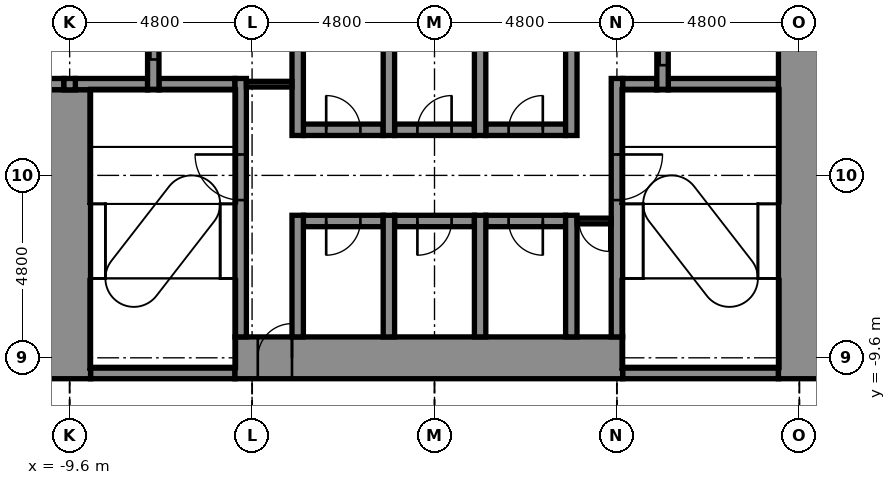
"""IFC4 building model, lengths in metres.
Left out: names, types, materials, properties, quantities, classifications, styles, units other than length and angle.
Written with IfcOpenShell. Run it as: python <this file> out.ifc"""

import sys

from ifc_helpers import new_model, si_unit, direction, frame, frame_2d, origin, place, context, subcontext, project, spatial, rectangle, extrude, element, fill, save


model = new_model("IFC4")
c1 = context("Model", 3, precision=1e-05, world=origin(), true_north=direction((0.0, 1.0)))
c2 = subcontext(c1, "Body", "Model", "MODEL_VIEW")
j1 = project(units=[si_unit("LENGTHUNIT", "METRE"), si_unit("PLANEANGLEUNIT", "RADIAN")], contexts=[c1])
p1 = place(None, origin())
s1 = spatial("IfcSite", under=j1, at=p1, CompositionType="ELEMENT")
p2 = place(p1, origin())
s2 = spatial("IfcBuilding", under=s1, at=p2, CompositionType="ELEMENT")
p3 = place(p2, frame((0.0, 0.0, 44.4)))
s3 = spatial("IfcBuildingStorey", under=s2, at=p3, CompositionType="ELEMENT", Elevation=44.4)
p4 = place(p3, frame((-9.05, -10.0, -0.25), z_axis=(0.0, 0.0, 1.0), x_axis=(1.0, 0.0, 0.0)))
e1 = element("IfcWall", 1, at=p4, inside=s3, PredefinedType="STANDARD", context=c2, shape_type="SweptSolid", body=[
    extrude(rectangle(XDim=3.8, YDim=0.3, at=frame_2d((1.9, 0.0))), origin(), (0.0, 0.0, 1.0), 5.5),
])
p5 = place(p3, frame((4.95, -10.0, -0.25), z_axis=(0.0, 0.0, 1.0), x_axis=(1.0, 0.0, 0.0)))
e2 = element("IfcWall", 2, at=p5, inside=s3, PredefinedType="STANDARD", context=c2, shape_type="SweptSolid", body=[
    extrude(rectangle(XDim=4.1, YDim=0.3, at=frame_2d((2.05, 0.0))), origin(), (0.0, 0.0, 1.0), 5.5),
])
p6 = place(p3, frame((-5.25, -9.6, -0.25), z_axis=(0.0, 0.0, 1.0), x_axis=(1.0, 0.0, 0.0)))
e3 = element("IfcWall", 3, at=p6, inside=s3, PredefinedType="SHEAR", context=c2, shape_type="SweptSolid", body=[
    extrude(rectangle(XDim=10.2, YDim=1.1, at=frame_2d((5.1, 0.0))), origin(), (0.0, 0.0, 1.0), 5.5),
])
p7 = place(p6, frame((0.6, 0.0, 0.25)))
e4 = element("IfcOpeningElement", 4, at=p7, cuts=e3, PredefinedType="OPENING", context=c2, shape_type="SweptSolid", body=[
    extrude(rectangle(XDim=0.9, YDim=2.1, at=frame_2d((0.45, 1.05))), frame((0.0, 0.56, 0.0), z_axis=(0.0, -1.0, 0.0), x_axis=(1.0, 0.0, 0.0)), (0.0, 0.0, 1.0), 1.12),
])
p8 = place(p3, frame((-3.45, -6.0, -0.25), z_axis=(0.0, 0.0, 1.0), x_axis=(1.0, 0.0, 0.0)))
e5 = element("IfcWall", 5, at=p8, inside=s3, PredefinedType="STANDARD", context=c2, shape_type="SweptSolid", body=[
    extrude(rectangle(XDim=2.1, YDim=0.3, at=frame_2d((1.05, 0.0))), origin(), (0.0, 0.0, 1.0), 5.5),
])
p9 = place(p8, frame((0.6, 0.0, 0.25)))
e6 = element("IfcOpeningElement", 6, at=p9, cuts=e5, PredefinedType="OPENING", context=c2, shape_type="SweptSolid", body=[
    extrude(rectangle(XDim=0.9, YDim=2.1, at=frame_2d((0.45, 1.05))), frame((0.0, 0.16, 0.0), z_axis=(0.0, -1.0, 0.0), x_axis=(1.0, 0.0, 0.0)), (0.0, 0.0, 1.0), 0.32),
])
p10 = place(p3, frame((-1.05, -6.0, -0.25), z_axis=(0.0, 0.0, 1.0), x_axis=(1.0, 0.0, 0.0)))
e7 = element("IfcWall", 7, at=p10, inside=s3, PredefinedType="STANDARD", context=c2, shape_type="SweptSolid", body=[
    extrude(rectangle(XDim=2.1, YDim=0.3, at=frame_2d((1.05, 0.0))), origin(), (0.0, 0.0, 1.0), 5.5),
])
p11 = place(p10, frame((0.6, 0.0, 0.25)))
e8 = element("IfcOpeningElement", 8, at=p11, cuts=e7, PredefinedType="OPENING", context=c2, shape_type="SweptSolid", body=[
    extrude(rectangle(XDim=0.9, YDim=2.1, at=frame_2d((0.45, 1.05))), frame((0.0, 0.16, 0.0), z_axis=(0.0, -1.0, 0.0), x_axis=(1.0, 0.0, 0.0)), (0.0, 0.0, 1.0), 0.32),
])
p12 = place(p3, frame((1.35, -6.0, -0.25), z_axis=(0.0, 0.0, 1.0), x_axis=(1.0, 0.0, 0.0)))
e9 = element("IfcWall", 9, at=p12, inside=s3, PredefinedType="STANDARD", context=c2, shape_type="SweptSolid", body=[
    extrude(rectangle(XDim=2.1, YDim=0.3, at=frame_2d((1.05, 0.0))), origin(), (0.0, 0.0, 1.0), 5.5),
])
p13 = place(p12, frame((0.6, 0.0, 0.25)))
e10 = element("IfcOpeningElement", 10, at=p13, cuts=e9, PredefinedType="OPENING", context=c2, shape_type="SweptSolid", body=[
    extrude(rectangle(XDim=0.9, YDim=2.1, at=frame_2d((0.45, 1.05))), frame((0.0, 0.16, 0.0), z_axis=(0.0, -1.0, 0.0), x_axis=(1.0, 0.0, 0.0)), (0.0, 0.0, 1.0), 0.32),
])
p14 = place(p3, frame((-3.45, -3.6, -0.25), z_axis=(0.0, 0.0, 1.0), x_axis=(1.0, 0.0, 0.0)))
e11 = element("IfcWall", 11, at=p14, inside=s3, PredefinedType="STANDARD", context=c2, shape_type="SweptSolid", body=[
    extrude(rectangle(XDim=2.1, YDim=0.3, at=frame_2d((1.05, 0.0))), origin(), (0.0, 0.0, 1.0), 5.5),
])
p15 = place(p14, frame((0.6, 0.0, 0.25)))
e12 = element("IfcOpeningElement", 12, at=p15, cuts=e11, PredefinedType="OPENING", context=c2, shape_type="SweptSolid", body=[
    extrude(rectangle(XDim=0.9, YDim=2.1, at=frame_2d((0.45, 1.05))), frame((0.0, 0.16, 0.0), z_axis=(0.0, -1.0, 0.0), x_axis=(1.0, 0.0, 0.0)), (0.0, 0.0, 1.0), 0.32),
])
p16 = place(p3, frame((-1.05, -3.6, -0.25), z_axis=(0.0, 0.0, 1.0), x_axis=(1.0, 0.0, 0.0)))
e13 = element("IfcWall", 13, at=p16, inside=s3, PredefinedType="STANDARD", context=c2, shape_type="SweptSolid", body=[
    extrude(rectangle(XDim=2.1, YDim=0.3, at=frame_2d((1.05, 0.0))), origin(), (0.0, 0.0, 1.0), 5.5),
])
p17 = place(p16, frame((0.6, 0.0, 0.25)))
e14 = element("IfcOpeningElement", 14, at=p17, cuts=e13, PredefinedType="OPENING", context=c2, shape_type="SweptSolid", body=[
    extrude(rectangle(XDim=0.9, YDim=2.1, at=frame_2d((0.45, 1.05))), frame((0.0, 0.16, 0.0), z_axis=(0.0, -1.0, 0.0), x_axis=(1.0, 0.0, 0.0)), (0.0, 0.0, 1.0), 0.32),
])
p18 = place(p3, frame((1.35, -3.6, -0.25), z_axis=(0.0, 0.0, 1.0), x_axis=(1.0, 0.0, 0.0)))
e15 = element("IfcWall", 15, at=p18, inside=s3, PredefinedType="STANDARD", context=c2, shape_type="SweptSolid", body=[
    extrude(rectangle(XDim=2.1, YDim=0.3, at=frame_2d((1.05, 0.0))), origin(), (0.0, 0.0, 1.0), 5.5),
])
p19 = place(p18, frame((0.6, 0.0, 0.25)))
e16 = element("IfcOpeningElement", 16, at=p19, cuts=e15, PredefinedType="OPENING", context=c2, shape_type="SweptSolid", body=[
    extrude(rectangle(XDim=0.9, YDim=2.1, at=frame_2d((0.45, 1.05))), frame((0.0, 0.16, 0.0), z_axis=(0.0, -1.0, 0.0), x_axis=(1.0, 0.0, 0.0)), (0.0, 0.0, 1.0), 0.32),
])
p20 = place(p3, frame((-10.85, -2.4, -0.25), z_axis=(0.0, 0.0, 1.0), x_axis=(1.0, 0.0, 0.0)))
e17 = element("IfcWall", 17, at=p20, inside=s3, PredefinedType="STANDARD", context=c2, shape_type="SweptSolid", body=[
    extrude(rectangle(XDim=1.1, YDim=0.3, at=frame_2d((0.55, 0.0))), origin(), (0.0, 0.0, 1.0), 5.5),
])
p21 = place(p3, frame((-9.45, -2.4, -0.25), z_axis=(0.0, 0.0, 1.0), x_axis=(1.0, 0.0, 0.0)))
e18 = element("IfcWall", 18, at=p21, inside=s3, PredefinedType="STANDARD", context=c2, shape_type="SweptSolid", body=[
    extrude(rectangle(XDim=1.9, YDim=0.3, at=frame_2d((0.95, 0.0))), origin(), (0.0, 0.0, 1.0), 5.5),
])
p22 = place(p3, frame((-7.25, -2.4, -0.25), z_axis=(0.0, 0.0, 1.0), x_axis=(1.0, 0.0, 0.0)))
e19 = element("IfcWall", 19, at=p22, inside=s3, PredefinedType="STANDARD", context=c2, shape_type="SweptSolid", body=[
    extrude(rectangle(XDim=2.0, YDim=0.3, at=frame_2d((1.0, 0.0))), origin(), (0.0, 0.0, 1.0), 5.5),
])
p23 = place(p3, frame((4.95, -2.4, -0.25), z_axis=(0.0, 0.0, 1.0), x_axis=(1.0, 0.0, 0.0)))
e20 = element("IfcWall", 20, at=p23, inside=s3, PredefinedType="STANDARD", context=c2, shape_type="SweptSolid", body=[
    extrude(rectangle(XDim=0.9, YDim=0.3, at=frame_2d((0.45, 0.0))), origin(), (0.0, 0.0, 1.0), 5.5),
])
p24 = place(p3, frame((6.15, -2.4, -0.25), z_axis=(0.0, 0.0, 1.0), x_axis=(1.0, 0.0, 0.0)))
e21 = element("IfcWall", 21, at=p24, inside=s3, PredefinedType="STANDARD", context=c2, shape_type="SweptSolid", body=[
    extrude(rectangle(XDim=2.9, YDim=0.3, at=frame_2d((1.45, 0.0))), origin(), (0.0, 0.0, 1.0), 5.5),
])
p25 = place(p3, frame((-9.6, -10.15, -0.25), z_axis=(0.0, 0.0, 1.0), x_axis=(0.0, 1.0, 0.0)))
e22 = element("IfcWall", 22, at=p25, inside=s3, PredefinedType="SHEAR", context=c2, shape_type="SweptSolid", body=[
    extrude(rectangle(XDim=7.6, YDim=1.1, at=frame_2d((3.8, 0.0))), origin(), (0.0, 0.0, 1.0), 5.5),
])
p26 = place(p3, frame((-9.6, -2.55, -0.25), z_axis=(0.0, 0.0, 1.0), x_axis=(0.0, 1.0, 0.0)))
e23 = element("IfcWall", 23, at=p26, inside=s3, PredefinedType="STANDARD", context=c2, shape_type="SweptSolid", body=[
    extrude(rectangle(XDim=0.3, YDim=0.3, at=frame_2d((0.15, 0.0))), origin(), (0.0, 0.0, 1.0), 5.5),
])
p27 = place(p3, frame((-7.4, -2.55, -0.25), z_axis=(0.0, 0.0, 1.0), x_axis=(0.0, 1.0, 0.0)))
e24 = element("IfcWall", 24, at=p27, inside=s3, PredefinedType="STANDARD", context=c2, shape_type="SweptSolid", body=[
    extrude(rectangle(XDim=5.1, YDim=0.3, at=frame_2d((2.55, 0.0))), origin(), (0.0, 0.0, 1.0), 5.5),
])
p28 = place(p27, frame((0.8, 0.0, 0.25)))
e25 = element("IfcOpeningElement", 25, at=p28, cuts=e24, PredefinedType="OPENING", context=c2, shape_type="SweptSolid", body=[
    extrude(rectangle(XDim=1.1, YDim=2.1, at=frame_2d((0.55, 1.05))), frame((0.0, 0.16, 0.0), z_axis=(0.0, -1.0, 0.0), x_axis=(1.0, 0.0, 0.0)), (0.0, 0.0, 1.0), 0.32),
])
p29 = place(p27, frame((3.2, 0.0, 0.25)))
e26 = element("IfcOpeningElement", 26, at=p29, cuts=e24, PredefinedType="OPENING", context=c2, shape_type="SweptSolid", body=[
    extrude(rectangle(XDim=1.1, YDim=2.1, at=frame_2d((0.55, 1.05))), frame((0.0, 0.16, 0.0), z_axis=(0.0, -1.0, 0.0), x_axis=(1.0, 0.0, 0.0)), (0.0, 0.0, 1.0), 0.32),
])
p30 = place(p3, frame((-5.1, -9.05, -0.25), z_axis=(0.0, 0.0, 1.0), x_axis=(0.0, 1.0, 0.0)))
e27 = element("IfcWall", 27, at=p30, inside=s3, PredefinedType="STANDARD", context=c2, shape_type="SweptSolid", body=[
    extrude(rectangle(XDim=6.8, YDim=0.3, at=frame_2d((3.4, 0.0))), origin(), (0.0, 0.0, 1.0), 5.5),
])
p31 = place(p30, frame((3.6, 0.0, 0.25)))
e28 = element("IfcOpeningElement", 28, at=p31, cuts=e27, PredefinedType="OPENING", context=c2, shape_type="SweptSolid", body=[
    extrude(rectangle(XDim=1.2, YDim=2.1, at=frame_2d((0.6, 1.05))), frame((0.0, 0.16, 0.0), z_axis=(0.0, -1.0, 0.0), x_axis=(1.0, 0.0, 0.0)), (0.0, 0.0, 1.0), 0.32),
])
p32 = place(p3, frame((-3.6, -9.05, -0.25), z_axis=(0.0, 0.0, 1.0), x_axis=(0.0, 1.0, 0.0)))
e29 = element("IfcWall", 29, at=p32, inside=s3, PredefinedType="STANDARD", context=c2, shape_type="SweptSolid", body=[
    extrude(rectangle(XDim=3.2, YDim=0.3, at=frame_2d((1.6, 0.0))), origin(), (0.0, 0.0, 1.0), 5.5),
])
p33 = place(p3, frame((-3.6, -3.75, -0.25), z_axis=(0.0, 0.0, 1.0), x_axis=(0.0, 1.0, 0.0)))
e30 = element("IfcWall", 30, at=p33, inside=s3, PredefinedType="STANDARD", context=c2, shape_type="SweptSolid", body=[
    extrude(rectangle(XDim=7.5, YDim=0.3, at=frame_2d((3.75, 0.0))), origin(), (0.0, 0.0, 1.0), 5.5),
])
p34 = place(p3, frame((-1.2, -9.05, -0.25), z_axis=(0.0, 0.0, 1.0), x_axis=(0.0, 1.0, 0.0)))
e31 = element("IfcWall", 31, at=p34, inside=s3, PredefinedType="STANDARD", context=c2, shape_type="SweptSolid", body=[
    extrude(rectangle(XDim=3.2, YDim=0.3, at=frame_2d((1.6, 0.0))), origin(), (0.0, 0.0, 1.0), 5.5),
])
p35 = place(p3, frame((-1.2, -3.75, -0.25), z_axis=(0.0, 0.0, 1.0), x_axis=(0.0, 1.0, 0.0)))
e32 = element("IfcWall", 32, at=p35, inside=s3, PredefinedType="STANDARD", context=c2, shape_type="SweptSolid", body=[
    extrude(rectangle(XDim=7.5, YDim=0.3, at=frame_2d((3.75, 0.0))), origin(), (0.0, 0.0, 1.0), 5.5),
])
p36 = place(p3, frame((1.2, -9.05, -0.25), z_axis=(0.0, 0.0, 1.0), x_axis=(0.0, 1.0, 0.0)))
e33 = element("IfcWall", 33, at=p36, inside=s3, PredefinedType="STANDARD", context=c2, shape_type="SweptSolid", body=[
    extrude(rectangle(XDim=3.2, YDim=0.3, at=frame_2d((1.6, 0.0))), origin(), (0.0, 0.0, 1.0), 5.5),
])
p37 = place(p3, frame((1.2, -3.75, -0.25), z_axis=(0.0, 0.0, 1.0), x_axis=(0.0, 1.0, 0.0)))
e34 = element("IfcWall", 34, at=p37, inside=s3, PredefinedType="STANDARD", context=c2, shape_type="SweptSolid", body=[
    extrude(rectangle(XDim=7.5, YDim=0.3, at=frame_2d((3.75, 0.0))), origin(), (0.0, 0.0, 1.0), 5.5),
])
p38 = place(p3, frame((3.6, -9.05, -0.25), z_axis=(0.0, 0.0, 1.0), x_axis=(0.0, 1.0, 0.0)))
e35 = element("IfcWall", 35, at=p38, inside=s3, PredefinedType="STANDARD", context=c2, shape_type="SweptSolid", body=[
    extrude(rectangle(XDim=3.2, YDim=0.3, at=frame_2d((1.6, 0.0))), origin(), (0.0, 0.0, 1.0), 5.5),
])
p39 = place(p3, frame((3.6, -3.75, -0.25), z_axis=(0.0, 0.0, 1.0), x_axis=(0.0, 1.0, 0.0)))
e36 = element("IfcWall", 36, at=p39, inside=s3, PredefinedType="STANDARD", context=c2, shape_type="SweptSolid", body=[
    extrude(rectangle(XDim=7.5, YDim=0.3, at=frame_2d((3.75, 0.0))), origin(), (0.0, 0.0, 1.0), 5.5),
])
p40 = place(p3, frame((4.8, -9.05, -0.25), z_axis=(0.0, 0.0, 1.0), x_axis=(0.0, 1.0, 0.0)))
e37 = element("IfcWall", 37, at=p40, inside=s3, PredefinedType="STANDARD", context=c2, shape_type="SweptSolid", body=[
    extrude(rectangle(XDim=6.8, YDim=0.3, at=frame_2d((3.4, 0.0))), origin(), (0.0, 0.0, 1.0), 5.5),
])
p41 = place(p40, frame((3.6, 0.0, 0.25)))
e38 = element("IfcOpeningElement", 38, at=p41, cuts=e37, PredefinedType="OPENING", context=c2, shape_type="SweptSolid", body=[
    extrude(rectangle(XDim=1.2, YDim=2.1, at=frame_2d((0.6, 1.05))), frame((0.0, 0.16, 0.0), z_axis=(0.0, -1.0, 0.0), x_axis=(1.0, 0.0, 0.0)), (0.0, 0.0, 1.0), 0.32),
])
p42 = place(p3, frame((6.0, -2.55, -0.25), z_axis=(0.0, 0.0, 1.0), x_axis=(0.0, 1.0, 0.0)))
e39 = element("IfcWall", 39, at=p42, inside=s3, PredefinedType="STANDARD", context=c2, shape_type="SweptSolid", body=[
    extrude(rectangle(XDim=7.5, YDim=0.3, at=frame_2d((3.75, 0.0))), origin(), (0.0, 0.0, 1.0), 5.5),
])
p43 = place(p42, frame((0.65, 0.0, 0.25)))
e40 = element("IfcOpeningElement", 40, at=p43, cuts=e39, PredefinedType="OPENING", context=c2, shape_type="SweptSolid", body=[
    extrude(rectangle(XDim=1.4, YDim=2.1, at=frame_2d((0.7, 1.05))), frame((0.0, 0.16, 0.0), z_axis=(0.0, -1.0, 0.0), x_axis=(1.0, 0.0, 0.0)), (0.0, 0.0, 1.0), 0.32),
])
p44 = place(p42, frame((3.05, 0.0, 0.25)))
e41 = element("IfcOpeningElement", 41, at=p44, cuts=e39, PredefinedType="OPENING", context=c2, shape_type="SweptSolid", body=[
    extrude(rectangle(XDim=1.4, YDim=2.1, at=frame_2d((0.7, 1.05))), frame((0.0, 0.16, 0.0), z_axis=(0.0, -1.0, 0.0), x_axis=(1.0, 0.0, 0.0)), (0.0, 0.0, 1.0), 0.32),
])
p45 = place(p42, frame((5.45, 0.0, 0.25)))
e42 = element("IfcOpeningElement", 42, at=p45, cuts=e39, PredefinedType="OPENING", context=c2, shape_type="SweptSolid", body=[
    extrude(rectangle(XDim=1.4, YDim=2.1, at=frame_2d((0.7, 1.05))), frame((0.0, 0.16, 0.0), z_axis=(0.0, -1.0, 0.0), x_axis=(1.0, 0.0, 0.0)), (0.0, 0.0, 1.0), 0.32),
])
p46 = place(p3, frame((9.6, -10.15, -0.25), z_axis=(0.0, 0.0, 1.0), x_axis=(0.0, 1.0, 0.0)))
e43 = element("IfcWall", 43, at=p46, inside=s3, PredefinedType="SHEAR", context=c2, shape_type="SweptSolid", body=[
    extrude(rectangle(XDim=20.3, YDim=1.1, at=frame_2d((10.15, 0.0))), origin(), (0.0, 0.0, 1.0), 5.5),
])
p47 = place(p3, frame((3.75, -6.0, 0.0), z_axis=(0.0, 0.0, 1.0), x_axis=(1.0, 0.0, 0.0)))
e44 = element("IfcWall", 44, at=p47, inside=s3, PredefinedType="PARTITIONING", context=c2, shape_type="SweptSolid", body=[
    extrude(rectangle(XDim=0.9, YDim=0.15, at=frame_2d((0.45, 0.0))), origin(), (0.0, 0.0, 1.0), 5.25),
])
p48 = place(p47, frame((0.05, 0.0, 0.0)))
e45 = element("IfcOpeningElement", 45, at=p48, cuts=e44, PredefinedType="OPENING", context=c2, shape_type="SweptSolid", body=[
    extrude(rectangle(XDim=0.8, YDim=2.1, at=frame_2d((0.4, 1.05))), frame((0.0, 0.085, 0.0), z_axis=(0.0, -1.0, 0.0), x_axis=(1.0, 0.0, 0.0)), (0.0, 0.0, 1.0), 0.17),
])
p49 = place(p3, frame((-4.95, -2.4, 0.0), z_axis=(0.0, 0.0, 1.0), x_axis=(1.0, 0.0, 0.0)))
e46 = element("IfcWall", 46, at=p49, inside=s3, PredefinedType="PARTITIONING", context=c2, shape_type="SweptSolid", body=[
    extrude(rectangle(XDim=1.2, YDim=0.15, at=frame_2d((0.6, 0.0))), origin(), (0.0, 0.0, 1.0), 5.25),
])
p50 = place(p48, frame((0.8, 0.0, 0.0), z_axis=(0.0, 0.0, 1.0), x_axis=(-1.0, 0.0, 0.0)))
e47 = element("IfcDoor", 47, at=p50, inside=s3, OperationType="SINGLE_SWING_RIGHT", PredefinedType="DOOR", context=c2, shape_type="SweptSolid", body=[
    extrude(rectangle(XDim=0.8, YDim=2.1, at=frame_2d((0.4, 1.05))), frame((0.0, 0.025, 0.0), z_axis=(0.0, -1.0, 0.0), x_axis=(1.0, 0.0, 0.0)), (0.0, 0.0, 1.0), 0.05),
])
fill(e45, e47)
p51 = place(p28, origin())
e48 = element("IfcDoor", 48, at=p51, inside=s3, OperationType="DOUBLE_DOOR_SLIDING", PredefinedType="DOOR", context=c2, shape_type="SweptSolid", body=[
    extrude(rectangle(XDim=1.1, YDim=2.1, at=frame_2d((0.55, 1.05))), frame((0.0, 0.025, 0.0), z_axis=(0.0, -1.0, 0.0), x_axis=(1.0, 0.0, 0.0)), (0.0, 0.0, 1.0), 0.05),
])
fill(e25, e48)
p52 = place(p43, origin())
e49 = element("IfcDoor", 49, at=p52, inside=s3, OperationType="DOUBLE_DOOR_SLIDING", PredefinedType="DOOR", context=c2, shape_type="SweptSolid", body=[
    extrude(rectangle(XDim=1.4, YDim=2.1, at=frame_2d((0.7, 1.05))), frame((0.0, 0.025, 0.0), z_axis=(0.0, -1.0, 0.0), x_axis=(1.0, 0.0, 0.0)), (0.0, 0.0, 1.0), 0.05),
])
fill(e40, e49)
p53 = place(p31, origin())
e50 = element("IfcDoor", 50, at=p53, inside=s3, OperationType="SINGLE_SWING_RIGHT", PredefinedType="DOOR", context=c2, shape_type="SweptSolid", body=[
    extrude(rectangle(XDim=1.2, YDim=2.1, at=frame_2d((0.6, 1.05))), frame((0.0, 0.025, 0.0), z_axis=(0.0, -1.0, 0.0), x_axis=(1.0, 0.0, 0.0)), (0.0, 0.0, 1.0), 0.05),
])
fill(e28, e50)
p54 = place(p41, frame((1.2, 0.0, 0.0), z_axis=(0.0, 0.0, 1.0), x_axis=(-1.0, 0.0, 0.0)))
e51 = element("IfcDoor", 51, at=p54, inside=s3, OperationType="SINGLE_SWING_RIGHT", PredefinedType="DOOR", context=c2, shape_type="SweptSolid", body=[
    extrude(rectangle(XDim=1.2, YDim=2.1, at=frame_2d((0.6, 1.05))), frame((0.0, 0.025, 0.0), z_axis=(0.0, -1.0, 0.0), x_axis=(1.0, 0.0, 0.0)), (0.0, 0.0, 1.0), 0.05),
])
fill(e38, e51)
p55 = place(p15, origin())
e52 = element("IfcDoor", 52, at=p55, inside=s3, OperationType="SINGLE_SWING_LEFT", PredefinedType="DOOR", context=c2, shape_type="SweptSolid", body=[
    extrude(rectangle(XDim=0.9, YDim=2.1, at=frame_2d((0.45, 1.05))), frame((0.0, 0.025, 0.0), z_axis=(0.0, -1.0, 0.0), x_axis=(1.0, 0.0, 0.0)), (0.0, 0.0, 1.0), 0.05),
])
fill(e12, e52)
p56 = place(p17, origin())
e53 = element("IfcDoor", 53, at=p56, inside=s3, OperationType="SINGLE_SWING_RIGHT", PredefinedType="DOOR", context=c2, shape_type="SweptSolid", body=[
    extrude(rectangle(XDim=0.9, YDim=2.1, at=frame_2d((0.45, 1.05))), frame((0.0, 0.025, 0.0), z_axis=(0.0, -1.0, 0.0), x_axis=(1.0, 0.0, 0.0)), (0.0, 0.0, 1.0), 0.05),
])
fill(e14, e53)
p57 = place(p19, origin())
e54 = element("IfcDoor", 54, at=p57, inside=s3, OperationType="SINGLE_SWING_RIGHT", PredefinedType="DOOR", context=c2, shape_type="SweptSolid", body=[
    extrude(rectangle(XDim=0.9, YDim=2.1, at=frame_2d((0.45, 1.05))), frame((0.0, 0.025, 0.0), z_axis=(0.0, -1.0, 0.0), x_axis=(1.0, 0.0, 0.0)), (0.0, 0.0, 1.0), 0.05),
])
fill(e16, e54)
p58 = place(p9, frame((0.9, 0.0, 0.0), z_axis=(0.0, 0.0, 1.0), x_axis=(-1.0, 0.0, 0.0)))
e55 = element("IfcDoor", 55, at=p58, inside=s3, OperationType="SINGLE_SWING_LEFT", PredefinedType="DOOR", context=c2, shape_type="SweptSolid", body=[
    extrude(rectangle(XDim=0.9, YDim=2.1, at=frame_2d((0.45, 1.05))), frame((0.0, 0.025, 0.0), z_axis=(0.0, -1.0, 0.0), x_axis=(1.0, 0.0, 0.0)), (0.0, 0.0, 1.0), 0.05),
])
fill(e6, e55)
p59 = place(p11, frame((0.9, 0.0, 0.0), z_axis=(0.0, 0.0, 1.0), x_axis=(-1.0, 0.0, 0.0)))
e56 = element("IfcDoor", 56, at=p59, inside=s3, OperationType="SINGLE_SWING_LEFT", PredefinedType="DOOR", context=c2, shape_type="SweptSolid", body=[
    extrude(rectangle(XDim=0.9, YDim=2.1, at=frame_2d((0.45, 1.05))), frame((0.0, 0.025, 0.0), z_axis=(0.0, -1.0, 0.0), x_axis=(1.0, 0.0, 0.0)), (0.0, 0.0, 1.0), 0.05),
])
fill(e8, e56)
p60 = place(p13, frame((0.9, 0.0, 0.0), z_axis=(0.0, 0.0, 1.0), x_axis=(-1.0, 0.0, 0.0)))
e57 = element("IfcDoor", 57, at=p60, inside=s3, OperationType="SINGLE_SWING_RIGHT", PredefinedType="DOOR", context=c2, shape_type="SweptSolid", body=[
    extrude(rectangle(XDim=0.9, YDim=2.1, at=frame_2d((0.45, 1.05))), frame((0.0, 0.025, 0.0), z_axis=(0.0, -1.0, 0.0), x_axis=(1.0, 0.0, 0.0)), (0.0, 0.0, 1.0), 0.05),
])
fill(e10, e57)
p61 = place(p7, origin())
e58 = element("IfcDoor", 58, at=p61, inside=s3, OperationType="SINGLE_SWING_RIGHT", PredefinedType="DOOR", context=c2, shape_type="SweptSolid", body=[
    extrude(rectangle(XDim=0.9, YDim=2.1, at=frame_2d((0.45, 1.05))), frame((0.0, 0.025, 0.0), z_axis=(0.0, -1.0, 0.0), x_axis=(1.0, 0.0, 0.0)), (0.0, 0.0, 1.0), 0.05),
])
fill(e4, e58)
save(model, sys.argv[1])
